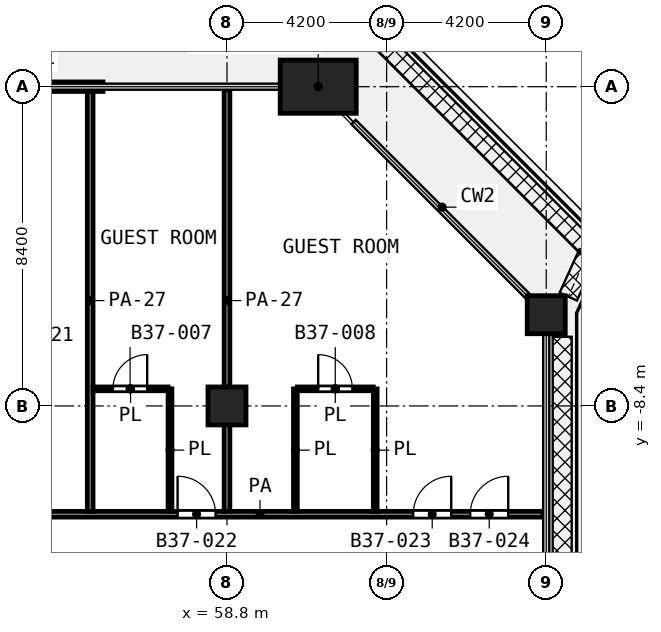
"""IFC4 building model, lengths in metres.
Left out: names, types, materials, properties, quantities, classifications, styles, units other than length and angle.
Written with IfcOpenShell. Run it as: python <this file> out.ifc"""

import sys

from ifc_helpers import new_model, si_unit, direction, frame, frame_2d, origin, origin_2d, place, context, subcontext, project, spatial, rectangle, extrude, element, fill, save


model = new_model("IFC4")
c1 = context("Model", 3, precision=1e-05, world=origin(), true_north=direction((0.0, 1.0)))
c2 = subcontext(c1, "Body", "Model", "MODEL_VIEW")
j1 = project(units=[si_unit("LENGTHUNIT", "METRE"), si_unit("PLANEANGLEUNIT", "RADIAN")], contexts=[c1])
p1 = place(None, origin())
s1 = spatial("IfcSite", under=j1, at=p1, CompositionType="ELEMENT")
p2 = place(p1, origin())
s2 = spatial("IfcBuilding", under=s1, at=p2, CompositionType="ELEMENT")
p3 = place(p2, frame((0.0, 0.0, 162.6)))
s3 = spatial("IfcBuildingStorey", under=s2, at=p3, CompositionType="ELEMENT", Elevation=162.6)
p4 = place(p3, frame((61.2, 0.0, 0.0), z_axis=(0.0, 0.0, 1.0), x_axis=(1.0, 0.0, 0.0)))
e1 = element("IfcColumn", 1, at=p4, inside=s3, PredefinedType="COLUMN", context=c2, shape_type="SweptSolid", body=[
    extrude(rectangle(XDim=2.0, YDim=1.4, at=origin_2d()), origin(), (0.0, 0.0, 1.0), 4.2),
])
for number, where, z_axis, x_axis in (
    (2, (67.2, -6.0, 0.0), (0.0, 0.0, 1.0), (1.0, 0.0, 0.0)),
    (3, (58.8, -8.4, 0.0), (0.0, 0.0, 1.0), (1.0, 0.0, 0.0)),
):
    element("IfcColumn", number, at=place(p3, frame(where, z_axis=z_axis, x_axis=x_axis)), inside=s3, PredefinedType="COLUMN", context=c2, shape_type="SweptSolid", body=[
        extrude(rectangle(XDim=1.0, YDim=1.0, at=origin_2d()), origin(), (0.0, 0.0, 1.0), 4.2),
    ])
p5 = place(p3, frame((55.538, 0.0, 0.0), z_axis=(0.0, 0.0, 1.0), x_axis=(-1.0, 0.0, 0.0)))
e4 = element("IfcWall", 4, at=p5, inside=s3, PredefinedType="SOLIDWALL", context=c2, shape_type="SweptSolid", body=[
    extrude(rectangle(XDim=4.663, YDim=0.25, at=frame_2d((2.331, 0.0))), origin(), (0.0, 0.0, 1.0), 2.58),
])
p6 = place(p5, frame((1.431, 0.0, 0.0)))
e5 = element("IfcOpeningElement", 5, at=p6, cuts=e4, PredefinedType="OPENING", context=c2, shape_type="SweptSolid", body=[
    extrude(rectangle(XDim=1.8, YDim=2.1, at=frame_2d((0.9, 1.05))), frame((0.0, 0.135, 0.0), z_axis=(0.0, -1.0, 0.0), x_axis=(1.0, 0.0, 0.0)), (0.0, 0.0, 1.0), 0.27),
])
p7 = place(p3, frame((55.275, -7.95, 0.0), z_axis=(0.0, 0.0, 1.0), x_axis=(1.0, 0.0, 0.0)))
e6 = element("IfcWall", 6, at=p7, inside=s3, PredefinedType="PARTITIONING", context=c2, shape_type="SweptSolid", body=[
    extrude(rectangle(XDim=1.975, YDim=0.1, at=frame_2d((0.988, 0.0))), origin(), (0.0, 0.0, 1.0), 3.6),
])
p8 = place(p7, frame((0.525, 0.0, 0.0)))
e7 = element("IfcOpeningElement", 7, at=p8, cuts=e6, PredefinedType="OPENING", context=c2, shape_type="SweptSolid", body=[
    extrude(rectangle(XDim=0.9, YDim=2.1, at=frame_2d((0.45, 1.05))), frame((0.0, 0.06, 0.0), z_axis=(0.0, -1.0, 0.0), x_axis=(1.0, 0.0, 0.0)), (0.0, 0.0, 1.0), 0.12),
])
p9 = place(p3, frame((60.651, -7.95, 0.0), z_axis=(0.0, 0.0, 1.0), x_axis=(1.0, 0.0, 0.0)))
e8 = element("IfcWall", 8, at=p9, inside=s3, PredefinedType="PARTITIONING", context=c2, shape_type="SweptSolid", body=[
    extrude(rectangle(XDim=1.997, YDim=0.1, at=frame_2d((0.999, 0.0))), origin(), (0.0, 0.0, 1.0), 3.6),
])
p10 = place(p9, frame((0.548, 0.0, 0.0)))
e9 = element("IfcOpeningElement", 9, at=p10, cuts=e8, PredefinedType="OPENING", context=c2, shape_type="SweptSolid", body=[
    extrude(rectangle(XDim=0.9, YDim=2.1, at=frame_2d((0.45, 1.05))), frame((0.0, 0.06, 0.0), z_axis=(0.0, -1.0, 0.0), x_axis=(1.0, 0.0, 0.0)), (0.0, 0.0, 1.0), 0.12),
])
p11 = place(p3, frame((57.3, -11.175, 0.0), z_axis=(0.0, 0.0, 1.0), x_axis=(0.0, 1.0, 0.0)))
e10 = element("IfcWall", 10, at=p11, inside=s3, PredefinedType="PARTITIONING", context=c2, shape_type="SweptSolid", body=[
    extrude(rectangle(XDim=3.225, YDim=0.1, at=frame_2d((1.613, 0.0))), origin(), (0.0, 0.0, 1.0), 3.6),
])
for number, where, z_axis, x_axis in (
    (11, (60.6, -11.175, 0.0), (0.0, 0.0, 1.0), (0.0, 1.0, 0.0)),
    (12, (62.7, -11.175, 0.0), (0.0, 0.0, 1.0), (0.0, 1.0, 0.0)),
):
    element("IfcWall", number, at=place(p3, frame(where, z_axis=z_axis, x_axis=x_axis)), inside=s3, PredefinedType="PARTITIONING", context=c2, shape_type="SweptSolid", body=[
        extrude(rectangle(XDim=3.223, YDim=0.1, at=frame_2d((1.612, 0.0))), origin(), (0.0, 0.0, 1.0), 3.6),
    ])
p12 = place(p3, frame((52.218, -11.25, 0.0), z_axis=(0.0, 0.0, 1.0), x_axis=(1.0, 0.0, 0.0)))
e13 = element("IfcWall", 13, at=p12, inside=s3, PredefinedType="PARTITIONING", context=c2, shape_type="SweptSolid", body=[
    extrude(rectangle(XDim=14.902, YDim=0.15, at=frame_2d((7.451, 0.0))), origin(), (0.0, 0.0, 1.0), 3.6),
])
p13 = place(p12, frame((5.282, 0.0, 0.0)))
e14 = element("IfcOpeningElement", 14, at=p13, cuts=e13, PredefinedType="OPENING", context=c2, shape_type="SweptSolid", body=[
    extrude(rectangle(XDim=1.0, YDim=2.1, at=frame_2d((0.5, 1.05))), frame((0.0, 0.085, 0.0), z_axis=(0.0, -1.0, 0.0), x_axis=(1.0, 0.0, 0.0)), (0.0, 0.0, 1.0), 0.17),
])
p14 = place(p12, frame((11.482, 0.0, 0.0)))
e15 = element("IfcOpeningElement", 15, at=p14, cuts=e13, PredefinedType="OPENING", context=c2, shape_type="SweptSolid", body=[
    extrude(rectangle(XDim=1.0, YDim=2.1, at=frame_2d((0.5, 1.05))), frame((0.0, 0.085, 0.0), z_axis=(0.0, -1.0, 0.0), x_axis=(1.0, 0.0, 0.0)), (0.0, 0.0, 1.0), 0.17),
])
p15 = place(p12, frame((12.982, 0.0, 0.0)))
e16 = element("IfcOpeningElement", 16, at=p15, cuts=e13, PredefinedType="OPENING", context=c2, shape_type="SweptSolid", body=[
    extrude(rectangle(XDim=1.0, YDim=2.1, at=frame_2d((0.5, 1.05))), frame((0.0, 0.085, 0.0), z_axis=(0.0, -1.0, 0.0), x_axis=(1.0, 0.0, 0.0)), (0.0, 0.0, 1.0), 0.17),
])
for number, where, z_axis, x_axis in (
    (17, (55.2, -11.175, 0.0), (0.0, 0.0, 1.0), (0.0, 1.0, 0.0)),
    (18, (58.8, -11.175, 0.0), (0.0, 0.0, 1.0), (0.0, 1.0, 0.0)),
):
    element("IfcWall", number, at=place(p3, frame(where, z_axis=z_axis, x_axis=x_axis)), inside=s3, PredefinedType="PARTITIONING", context=c2, shape_type="SweptSolid", body=[
        extrude(rectangle(XDim=11.095, YDim=0.15, at=frame_2d((5.547, 0.0))), origin(), (0.0, 0.0, 1.0), 2.7),
    ])
p16 = place(p13, origin())
e19 = element("IfcDoor", 19, at=p16, inside=s3, OperationType="SINGLE_SWING_LEFT", PredefinedType="DOOR", context=c2, shape_type="SweptSolid", body=[
    extrude(rectangle(XDim=1.0, YDim=2.1, at=frame_2d((0.5, 1.05))), frame((0.0, 0.025, 0.0), z_axis=(0.0, -1.0, 0.0), x_axis=(1.0, 0.0, 0.0)), (0.0, 0.0, 1.0), 0.05),
])
fill(e14, e19)
p17 = place(p8, origin())
e20 = element("IfcDoor", 20, at=p17, inside=s3, OperationType="SINGLE_SWING_RIGHT", PredefinedType="DOOR", context=c2, shape_type="SweptSolid", body=[
    extrude(rectangle(XDim=0.9, YDim=2.1, at=frame_2d((0.45, 1.05))), frame((0.0, 0.025, 0.0), z_axis=(0.0, -1.0, 0.0), x_axis=(1.0, 0.0, 0.0)), (0.0, 0.0, 1.0), 0.05),
])
fill(e7, e20)
p18 = place(p14, origin())
e21 = element("IfcDoor", 21, at=p18, inside=s3, OperationType="SINGLE_SWING_RIGHT", PredefinedType="DOOR", context=c2, shape_type="SweptSolid", body=[
    extrude(rectangle(XDim=1.0, YDim=2.1, at=frame_2d((0.5, 1.05))), frame((0.0, 0.025, 0.0), z_axis=(0.0, -1.0, 0.0), x_axis=(1.0, 0.0, 0.0)), (0.0, 0.0, 1.0), 0.05),
])
fill(e15, e21)
p19 = place(p15, origin())
e22 = element("IfcDoor", 22, at=p19, inside=s3, OperationType="SINGLE_SWING_RIGHT", PredefinedType="DOOR", context=c2, shape_type="SweptSolid", body=[
    extrude(rectangle(XDim=1.0, YDim=2.1, at=frame_2d((0.5, 1.05))), frame((0.0, 0.025, 0.0), z_axis=(0.0, -1.0, 0.0), x_axis=(1.0, 0.0, 0.0)), (0.0, 0.0, 1.0), 0.05),
])
fill(e16, e22)
p20 = place(p10, origin())
e23 = element("IfcDoor", 23, at=p20, inside=s3, OperationType="SINGLE_SWING_LEFT", PredefinedType="DOOR", context=c2, shape_type="SweptSolid", body=[
    extrude(rectangle(XDim=0.9, YDim=2.1, at=frame_2d((0.45, 1.05))), frame((0.0, 0.025, 0.0), z_axis=(0.0, -1.0, 0.0), x_axis=(1.0, 0.0, 0.0)), (0.0, 0.0, 1.0), 0.05),
])
fill(e9, e23)
save(model, sys.argv[1])
